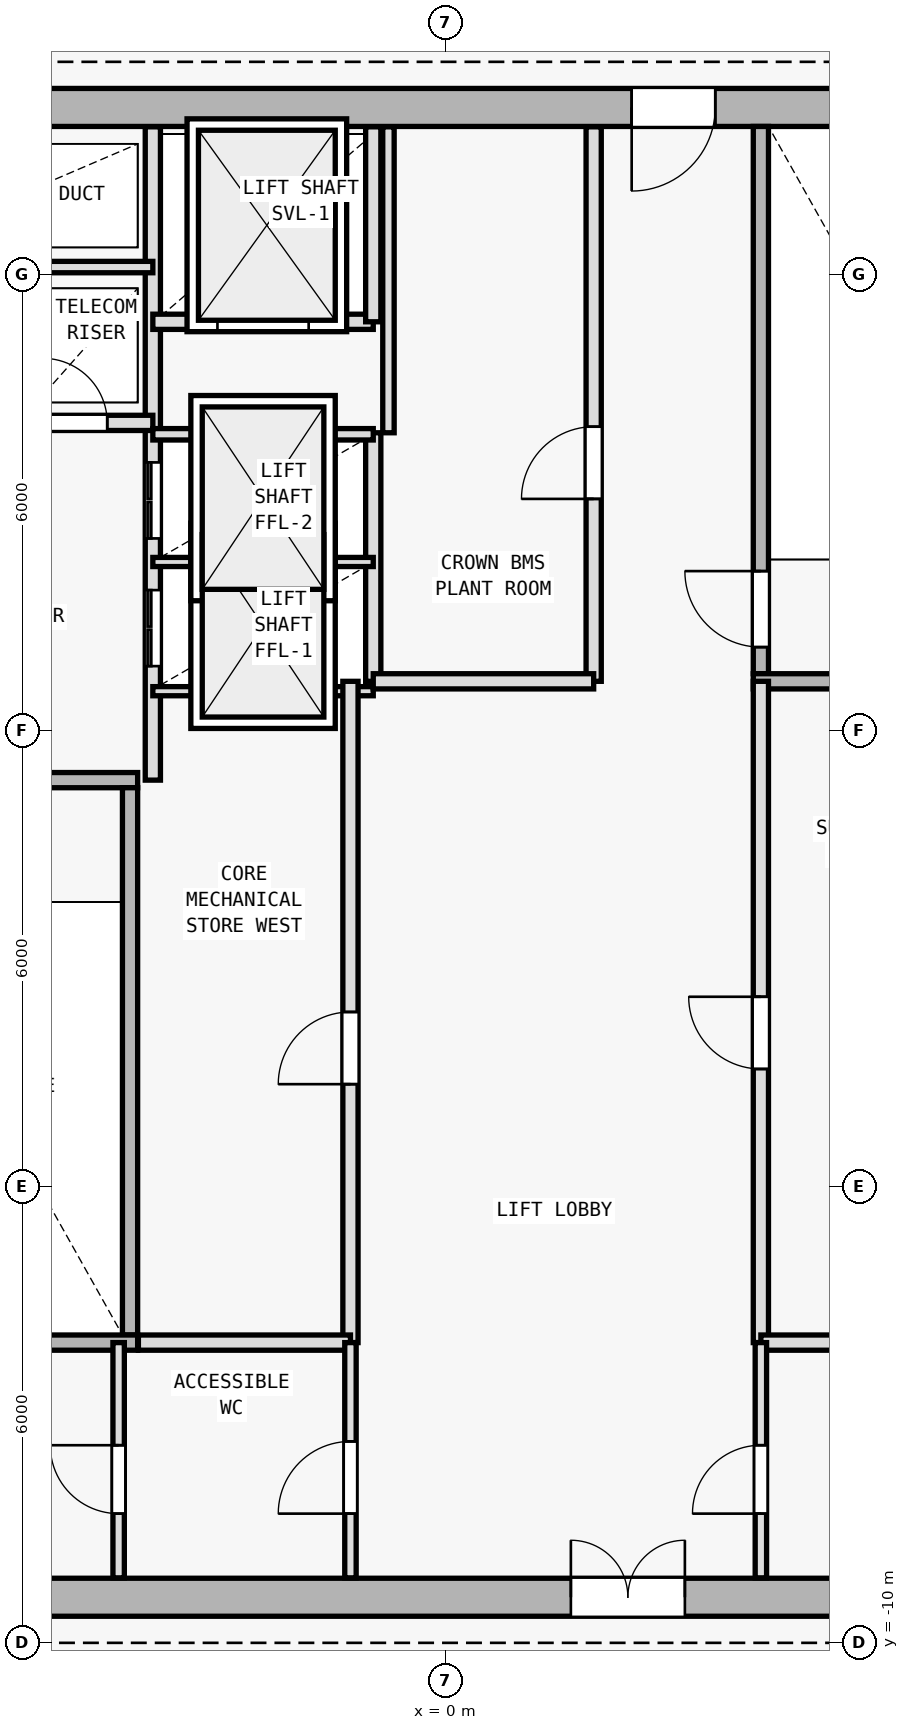
"""IFC4 building model, lengths in metres.
Left out: names, types, materials, properties, quantities, classifications, styles, units other than length and angle.
Written with IfcOpenShell. Run it as: python <this file> out.ifc"""

import sys

from ifc_helpers import new_model, si_unit, direction, frame, frame_2d, origin, origin_2d, place, context, subcontext, project, spatial, rectangle, i_section, extrude, element, fill, save


model = new_model("IFC4")
c1 = context("Model", 3, precision=1e-05, world=origin(), true_north=direction((0.0, 1.0)))
c2 = subcontext(c1, "Body", "Model", "MODEL_VIEW")
j1 = project(units=[si_unit("LENGTHUNIT", "METRE"), si_unit("PLANEANGLEUNIT", "RADIAN")], contexts=[c1])
p1 = place(None, origin())
s1 = spatial("IfcSite", under=j1, at=p1, CompositionType="ELEMENT")
p2 = place(p1, origin())
s2 = spatial("IfcBuilding", under=s1, at=p2, CompositionType="ELEMENT")
p3 = place(p2, frame((0.0, 0.0, 319.2)))
s3 = spatial("IfcBuildingStorey", under=s2, at=p3, CompositionType="ELEMENT", Elevation=319.2)
p4 = place(p3, frame((0.0, -9.4, 0.0), z_axis=(0.0, 0.0, 1.0), x_axis=(1.0, 0.0, 0.0)))
e1 = element("IfcColumn", 1, at=p4, inside=s3, PredefinedType="COLUMN", context=c2, shape_type="SweptSolid", body=[
    extrude(i_section(OverallWidth=0.374, OverallDepth=0.372, WebThickness=0.012, FlangeThickness=0.02, FilletRadius=0.015, at=origin_2d()), origin(), (0.0, 0.0, 1.0), 3.6),
])
p5 = place(p3, frame((-22.517, -9.441, 0.0), z_axis=(0.0, 0.0, 1.0), x_axis=(0.562470833944, 0.826817126675, 0.0)))
e2 = element("IfcWall", 2, at=p5, inside=s3, PredefinedType="SOLIDWALL", context=c2, shape_type="SweptSolid", body=[
    extrude(rectangle(XDim=36.623, YDim=0.22, at=frame_2d((18.312, 0.0))), origin(), (0.0, 0.0, 1.0), 2.447),
])
p6 = place(p3, frame((-7.95, -9.4, 0.0), z_axis=(0.0, 0.0, 1.0), x_axis=(1.0, 0.0, 0.0)))
e3 = element("IfcWall", 3, at=p6, inside=s3, PredefinedType="SHEAR", context=c2, shape_type="SweptSolid", body=[
    extrude(rectangle(XDim=15.9, YDim=0.5, at=frame_2d((7.95, 0.0))), origin(), (0.0, 0.0, 1.0), 2.4),
])
p7 = place(p6, frame((9.6, 0.0, 0.0)))
e4 = element("IfcOpeningElement", 4, at=p7, cuts=e3, PredefinedType="OPENING", context=c2, shape_type="SweptSolid", body=[
    extrude(rectangle(XDim=1.5, YDim=2.2, at=frame_2d((0.75, 1.1))), frame((0.0, 0.26, 0.0), z_axis=(0.0, -1.0, 0.0), x_axis=(1.0, 0.0, 0.0)), (0.0, 0.0, 1.0), 0.52),
])
p8 = place(p3, frame((7.95, 10.2, 0.0), z_axis=(0.0, 0.0, 1.0), x_axis=(-1.0, 0.0, 0.0)))
e5 = element("IfcWall", 5, at=p8, inside=s3, PredefinedType="SHEAR", context=c2, shape_type="SweptSolid", body=[
    extrude(rectangle(XDim=15.9, YDim=0.5, at=frame_2d((7.95, 0.0))), origin(), (0.0, 0.0, 1.0), 2.4),
])
p9 = place(p8, frame((4.4, 0.0, 0.0)))
e6 = element("IfcOpeningElement", 6, at=p9, cuts=e5, PredefinedType="OPENING", context=c2, shape_type="SweptSolid", body=[
    extrude(rectangle(XDim=1.1, YDim=2.15, at=frame_2d((0.55, 1.075))), frame((0.0, 0.26, 0.0), z_axis=(0.0, -1.0, 0.0), x_axis=(1.0, 0.0, 0.0)), (0.0, 0.0, 1.0), 0.52),
])
p10 = place(p3, frame((-7.45, 1.35, 0.0), z_axis=(0.0, 0.0, 1.0), x_axis=(1.0, 0.0, 0.0)))
e7 = element("IfcWall", 7, at=p10, inside=s3, PredefinedType="SOLIDWALL", context=c2, shape_type="SweptSolid", body=[
    extrude(rectangle(XDim=3.4, YDim=0.2, at=frame_2d((1.7, 0.0))), origin(), (0.0, 0.0, 1.0), 2.4),
])
p11 = place(p10, frame((0.65, 0.0, 0.0)))
e8 = element("IfcOpeningElement", 8, at=p11, cuts=e7, PredefinedType="OPENING", context=c2, shape_type="SweptSolid", body=[
    extrude(rectangle(XDim=1.0, YDim=2.15, at=frame_2d((0.5, 1.075))), frame((0.0, 0.11, 0.0), z_axis=(0.0, -1.0, 0.0), x_axis=(1.0, 0.0, 0.0)), (0.0, 0.0, 1.0), 0.22),
])
p12 = place(p3, frame((-4.15, -5.95, 0.0), z_axis=(0.0, 0.0, 1.0), x_axis=(0.0, 1.0, 0.0)))
e9 = element("IfcWall", 9, at=p12, inside=s3, PredefinedType="SOLIDWALL", context=c2, shape_type="SweptSolid", body=[
    extrude(rectangle(XDim=7.2, YDim=0.2, at=frame_2d((3.6, 0.0))), origin(), (0.0, 0.0, 1.0), 2.4),
])
p13 = place(p3, frame((-3.85, 1.35, 0.0), z_axis=(0.0, 0.0, 1.0), x_axis=(0.0, 1.0, 0.0)))
e10 = element("IfcWall", 10, at=p13, inside=s3, PredefinedType="SOLIDWALL", context=c2, shape_type="SweptSolid", body=[
    extrude(rectangle(XDim=8.595, YDim=0.2, at=frame_2d((4.297, 0.0))), origin(), (0.0, 0.0, 1.0), 2.4),
])
p14 = place(p13, frame((1.5, 0.0, 0.0)))
e11 = element("IfcOpeningElement", 11, at=p14, cuts=e10, PredefinedType="OPENING", context=c2, shape_type="SweptSolid", body=[
    extrude(rectangle(XDim=1.0, YDim=2.15, at=frame_2d((0.5, 1.075))), frame((0.0, 0.11, 0.0), z_axis=(0.0, -1.0, 0.0), x_axis=(1.0, 0.0, 0.0)), (0.0, 0.0, 1.0), 0.22),
])
p15 = place(p13, frame((3.18, 0.0, 0.0)))
e12 = element("IfcOpeningElement", 12, at=p15, cuts=e10, PredefinedType="OPENING", context=c2, shape_type="SweptSolid", body=[
    extrude(rectangle(XDim=1.0, YDim=2.15, at=frame_2d((0.5, 1.075))), frame((0.0, 0.11, 0.0), z_axis=(0.0, -1.0, 0.0), x_axis=(1.0, 0.0, 0.0)), (0.0, 0.0, 1.0), 0.22),
])
p16 = place(p3, frame((-7.445, 6.05, 0.0), z_axis=(0.0, 0.0, 1.0), x_axis=(1.0, 0.0, 0.0)))
e13 = element("IfcWall", 13, at=p16, inside=s3, PredefinedType="SOLIDWALL", context=c2, shape_type="SweptSolid", body=[
    extrude(rectangle(XDim=3.595, YDim=0.2, at=frame_2d((1.797, 0.0))), origin(), (0.0, 0.0, 1.0), 2.4),
])
p17 = place(p16, frame((0.345, 0.0, 0.0)))
e14 = element("IfcOpeningElement", 14, at=p17, cuts=e13, PredefinedType="OPENING", context=c2, shape_type="SweptSolid", body=[
    extrude(rectangle(XDim=0.85, YDim=2.1, at=frame_2d((0.425, 1.05))), frame((0.0, 0.11, 0.0), z_axis=(0.0, -1.0, 0.0), x_axis=(1.0, 0.0, 0.0)), (0.0, 0.0, 1.0), 0.22),
])
p18 = place(p16, frame((2.145, 0.0, 0.0)))
e15 = element("IfcOpeningElement", 15, at=p18, cuts=e13, PredefinedType="OPENING", context=c2, shape_type="SweptSolid", body=[
    extrude(rectangle(XDim=0.85, YDim=2.1, at=frame_2d((0.425, 1.05))), frame((0.0, 0.11, 0.0), z_axis=(0.0, -1.0, 0.0), x_axis=(1.0, 0.0, 0.0)), (0.0, 0.0, 1.0), 0.22),
])
p19 = place(p3, frame((-7.445, 8.1, 0.0), z_axis=(0.0, 0.0, 1.0), x_axis=(1.0, 0.0, 0.0)))
e16 = element("IfcWall", 16, at=p19, inside=s3, PredefinedType="PARTITIONING", context=c2, shape_type="SweptSolid", body=[
    extrude(rectangle(XDim=3.595, YDim=0.15, at=frame_2d((1.797, 0.0))), origin(), (0.0, 0.0, 1.0), 2.4),
])
p20 = place(p3, frame((4.15, 2.75, 0.0), z_axis=(0.0, 0.0, 1.0), x_axis=(0.0, 1.0, 0.0)))
e17 = element("IfcWall", 17, at=p20, inside=s3, PredefinedType="SOLIDWALL", context=c2, shape_type="SweptSolid", body=[
    extrude(rectangle(XDim=7.2, YDim=0.2, at=frame_2d((3.6, 0.0))), origin(), (0.0, 0.0, 1.0), 2.4),
])
p21 = place(p20, frame((0.35, 0.0, 0.0)))
e18 = element("IfcOpeningElement", 18, at=p21, cuts=e17, PredefinedType="OPENING", context=c2, shape_type="SweptSolid", body=[
    extrude(rectangle(XDim=1.0, YDim=2.15, at=frame_2d((0.5, 1.075))), frame((0.0, 0.11, 0.0), z_axis=(0.0, -1.0, 0.0), x_axis=(1.0, 0.0, 0.0)), (0.0, 0.0, 1.0), 0.22),
])
p22 = place(p3, frame((4.05, 2.65, 0.0), z_axis=(0.0, 0.0, 1.0), x_axis=(1.0, 0.0, 0.0)))
e19 = element("IfcWall", 19, at=p22, inside=s3, PredefinedType="SOLIDWALL", context=c2, shape_type="SweptSolid", body=[
    extrude(rectangle(XDim=3.4, YDim=0.2, at=frame_2d((1.7, 0.0))), origin(), (0.0, 0.0, 1.0), 2.4),
])
p23 = place(p3, frame((-0.95, 2.65, 0.0), z_axis=(0.0, 0.0, 1.0), x_axis=(0.0, 1.0, 0.0)))
e20 = element("IfcWall", 20, at=p23, inside=s3, PredefinedType="SOLIDWALL", context=c2, shape_type="SweptSolid", body=[
    extrude(rectangle(XDim=3.27, YDim=0.2, at=frame_2d((1.635, 0.0))), origin(), (0.0, 0.0, 1.0), 2.4),
])
for number, where, z_axis, x_axis in (
    (21, (-3.85, 2.52, 0.0), (0.0, 0.0, 1.0), (1.0, 0.0, 0.0)),
    (22, (-3.85, 4.22, 0.0), (0.0, 0.0, 1.0), (1.0, 0.0, 0.0)),
):
    element("IfcWall", number, at=place(p3, frame(where, z_axis=z_axis, x_axis=x_axis)), inside=s3, PredefinedType="PARTITIONING", context=c2, shape_type="SweptSolid", body=[
        extrude(rectangle(XDim=2.9, YDim=0.12, at=frame_2d((1.45, 0.0))), origin(), (0.0, 0.0, 1.0), 2.4),
    ])
p24 = place(p3, frame((-3.85, 5.9, 0.0), z_axis=(0.0, 0.0, 1.0), x_axis=(1.0, 0.0, 0.0)))
e23 = element("IfcWall", 23, at=p24, inside=s3, PredefinedType="PARTITIONING", context=c2, shape_type="SweptSolid", body=[
    extrude(rectangle(XDim=2.9, YDim=0.15, at=frame_2d((1.45, 0.0))), origin(), (0.0, 0.0, 1.0), 2.4),
])
p25 = place(p3, frame((-3.85, 7.38, 0.0), z_axis=(0.0, 0.0, 1.0), x_axis=(1.0, 0.0, 0.0)))
e24 = element("IfcWall", 24, at=p25, inside=s3, PredefinedType="SOLIDWALL", context=c2, shape_type="SweptSolid", body=[
    extrude(rectangle(XDim=2.9, YDim=0.2, at=frame_2d((1.45, 0.0))), origin(), (0.0, 0.0, 1.0), 2.4),
])
p26 = place(p25, frame((0.85, 0.0, 0.0)))
e25 = element("IfcOpeningElement", 25, at=p26, cuts=e24, PredefinedType="OPENING", context=c2, shape_type="SweptSolid", body=[
    extrude(rectangle(XDim=1.2, YDim=2.2, at=frame_2d((0.6, 1.1))), frame((0.0, 0.11, 0.0), z_axis=(0.0, -1.0, 0.0), x_axis=(1.0, 0.0, 0.0)), (0.0, 0.0, 1.0), 0.22),
])
p27 = place(p3, frame((-0.95, 7.38, 0.0), z_axis=(0.0, 0.0, 1.0), x_axis=(0.0, 1.0, 0.0)))
e26 = element("IfcWall", 26, at=p27, inside=s3, PredefinedType="SOLIDWALL", context=c2, shape_type="SweptSolid", body=[
    extrude(rectangle(XDim=2.565, YDim=0.2, at=frame_2d((1.283, 0.0))), origin(), (0.0, 0.0, 1.0), 2.4),
])
p28 = place(p3, frame((4.15, -6.05, 0.0), z_axis=(0.0, 0.0, 1.0), x_axis=(0.0, 1.0, 0.0)))
e27 = element("IfcWall", 27, at=p28, inside=s3, PredefinedType="SOLIDWALL", context=c2, shape_type="SweptSolid", body=[
    extrude(rectangle(XDim=8.7, YDim=0.2, at=frame_2d((4.35, 0.0))), origin(), (0.0, 0.0, 1.0), 2.4),
])
p29 = place(p28, frame((3.6, 0.0, 0.0)))
e28 = element("IfcOpeningElement", 28, at=p29, cuts=e27, PredefinedType="OPENING", context=c2, shape_type="SweptSolid", body=[
    extrude(rectangle(XDim=0.95, YDim=2.1, at=frame_2d((0.475, 1.05))), frame((0.0, 0.11, 0.0), z_axis=(0.0, -1.0, 0.0), x_axis=(1.0, 0.0, 0.0)), (0.0, 0.0, 1.0), 0.22),
])
p30 = place(p3, frame((-1.25, -6.05, 0.0), z_axis=(0.0, 0.0, 1.0), x_axis=(0.0, 1.0, 0.0)))
e29 = element("IfcWall", 29, at=p30, inside=s3, PredefinedType="SOLIDWALL", context=c2, shape_type="SweptSolid", body=[
    extrude(rectangle(XDim=8.7, YDim=0.2, at=frame_2d((4.35, 0.0))), origin(), (0.0, 0.0, 1.0), 2.4),
])
p31 = place(p30, frame((3.4, 0.0, 0.0)))
e30 = element("IfcOpeningElement", 30, at=p31, cuts=e29, PredefinedType="OPENING", context=c2, shape_type="SweptSolid", body=[
    extrude(rectangle(XDim=0.95, YDim=2.1, at=frame_2d((0.475, 1.05))), frame((0.0, 0.11, 0.0), z_axis=(0.0, -1.0, 0.0), x_axis=(1.0, 0.0, 0.0)), (0.0, 0.0, 1.0), 0.22),
])
p32 = place(p3, frame((1.95, 2.65, 0.0), z_axis=(0.0, 0.0, 1.0), x_axis=(0.0, 1.0, 0.0)))
e31 = element("IfcWall", 31, at=p32, inside=s3, PredefinedType="SOLIDWALL", context=c2, shape_type="SweptSolid", body=[
    extrude(rectangle(XDim=7.295, YDim=0.2, at=frame_2d((3.647, 0.0))), origin(), (0.0, 0.0, 1.0), 2.4),
])
p33 = place(p32, frame((2.4, 0.0, 0.0)))
e32 = element("IfcOpeningElement", 32, at=p33, cuts=e31, PredefinedType="OPENING", context=c2, shape_type="SweptSolid", body=[
    extrude(rectangle(XDim=0.95, YDim=2.1, at=frame_2d((0.475, 1.05))), frame((0.0, 0.11, 0.0), z_axis=(0.0, -1.0, 0.0), x_axis=(1.0, 0.0, 0.0)), (0.0, 0.0, 1.0), 0.22),
])
p34 = place(p3, frame((-0.95, 2.65, 0.0), z_axis=(0.0, 0.0, 1.0), x_axis=(1.0, 0.0, 0.0)))
e33 = element("IfcWall", 33, at=p34, inside=s3, PredefinedType="SOLIDWALL", context=c2, shape_type="SweptSolid", body=[
    extrude(rectangle(XDim=2.9, YDim=0.2, at=frame_2d((1.45, 0.0))), origin(), (0.0, 0.0, 1.0), 2.4),
])
p35 = place(p3, frame((-0.75, 5.92, 0.0), z_axis=(0.0, 0.0, 1.0), x_axis=(0.0, 1.0, 0.0)))
e34 = element("IfcWall", 34, at=p35, inside=s3, PredefinedType="PARTITIONING", context=c2, shape_type="SweptSolid", body=[
    extrude(rectangle(XDim=4.025, YDim=0.15, at=frame_2d((2.013, 0.0))), origin(), (0.0, 0.0, 1.0), 2.4),
])
p36 = place(p3, frame((-7.45, -6.05, 0.0), z_axis=(0.0, 0.0, 1.0), x_axis=(1.0, 0.0, 0.0)))
e35 = element("IfcWall", 35, at=p36, inside=s3, PredefinedType="SOLIDWALL", context=c2, shape_type="SweptSolid", body=[
    extrude(rectangle(XDim=3.4, YDim=0.2, at=frame_2d((1.7, 0.0))), origin(), (0.0, 0.0, 1.0), 2.4),
])
p37 = place(p3, frame((-4.04, -6.05, 0.0), z_axis=(0.0, 0.0, 1.0), x_axis=(1.0, 0.0, 0.0)))
e36 = element("IfcWall", 36, at=p37, inside=s3, PredefinedType="SOLIDWALL", context=c2, shape_type="SweptSolid", body=[
    extrude(rectangle(XDim=2.79, YDim=0.2, at=frame_2d((1.395, 0.0))), origin(), (0.0, 0.0, 1.0), 2.4),
])
p38 = place(p3, frame((4.15, -6.05, 0.0), z_axis=(0.0, 0.0, 1.0), x_axis=(1.0, 0.0, 0.0)))
e37 = element("IfcWall", 37, at=p38, inside=s3, PredefinedType="SOLIDWALL", context=c2, shape_type="SweptSolid", body=[
    extrude(rectangle(XDim=3.295, YDim=0.2, at=frame_2d((1.647, 0.0))), origin(), (0.0, 0.0, 1.0), 2.4),
])
p39 = place(p3, frame((-1.25, -9.145, 0.0), z_axis=(0.0, 0.0, 1.0), x_axis=(0.0, 1.0, 0.0)))
e38 = element("IfcWall", 38, at=p39, inside=s3, PredefinedType="PARTITIONING", context=c2, shape_type="SweptSolid", body=[
    extrude(rectangle(XDim=3.095, YDim=0.15, at=frame_2d((1.547, 0.0))), origin(), (0.0, 0.0, 1.0), 2.4),
])
p40 = place(p39, frame((0.845, 0.0, 0.0)))
e39 = element("IfcOpeningElement", 39, at=p40, cuts=e38, PredefinedType="OPENING", context=c2, shape_type="SweptSolid", body=[
    extrude(rectangle(XDim=0.95, YDim=2.1, at=frame_2d((0.475, 1.05))), frame((0.0, 0.085, 0.0), z_axis=(0.0, -1.0, 0.0), x_axis=(1.0, 0.0, 0.0)), (0.0, 0.0, 1.0), 0.17),
])
p41 = place(p3, frame((4.15, -9.145, 0.0), z_axis=(0.0, 0.0, 1.0), x_axis=(0.0, 1.0, 0.0)))
e40 = element("IfcWall", 40, at=p41, inside=s3, PredefinedType="PARTITIONING", context=c2, shape_type="SweptSolid", body=[
    extrude(rectangle(XDim=3.095, YDim=0.15, at=frame_2d((1.547, 0.0))), origin(), (0.0, 0.0, 1.0), 2.4),
])
p42 = place(p41, frame((0.845, 0.0, 0.0)))
e41 = element("IfcOpeningElement", 41, at=p42, cuts=e40, PredefinedType="OPENING", context=c2, shape_type="SweptSolid", body=[
    extrude(rectangle(XDim=0.9, YDim=2.1, at=frame_2d((0.45, 1.05))), frame((0.0, 0.085, 0.0), z_axis=(0.0, -1.0, 0.0), x_axis=(1.0, 0.0, 0.0)), (0.0, 0.0, 1.0), 0.17),
])
p43 = place(p3, frame((-4.3, -9.145, 0.0), z_axis=(0.0, 0.0, 1.0), x_axis=(0.0, 1.0, 0.0)))
e42 = element("IfcWall", 42, at=p43, inside=s3, PredefinedType="PARTITIONING", context=c2, shape_type="SweptSolid", body=[
    extrude(rectangle(XDim=3.095, YDim=0.15, at=frame_2d((1.547, 0.0))), origin(), (0.0, 0.0, 1.0), 2.4),
])
p44 = place(p43, frame((0.845, 0.0, 0.0)))
e43 = element("IfcOpeningElement", 43, at=p44, cuts=e42, PredefinedType="OPENING", context=c2, shape_type="SweptSolid", body=[
    extrude(rectangle(XDim=0.9, YDim=2.1, at=frame_2d((0.45, 1.05))), frame((0.0, 0.085, 0.0), z_axis=(0.0, -1.0, 0.0), x_axis=(1.0, 0.0, 0.0)), (0.0, 0.0, 1.0), 0.17),
])
p45 = place(p7, origin())
e44 = element("IfcDoor", 44, at=p45, inside=s3, OperationType="DOUBLE_DOOR_SINGLE_SWING", PredefinedType="DOOR", context=c2, shape_type="SweptSolid", body=[
    extrude(rectangle(XDim=1.5, YDim=2.2, at=frame_2d((0.75, 1.1))), frame((0.0, 0.025, 0.0), z_axis=(0.0, -1.0, 0.0), x_axis=(1.0, 0.0, 0.0)), (0.0, 0.0, 1.0), 0.05),
])
fill(e4, e44)
p46 = place(p9, origin())
e45 = element("IfcDoor", 45, at=p46, inside=s3, OperationType="SINGLE_SWING_RIGHT", PredefinedType="DOOR", context=c2, shape_type="SweptSolid", body=[
    extrude(rectangle(XDim=1.1, YDim=2.15, at=frame_2d((0.55, 1.075))), frame((0.0, 0.025, 0.0), z_axis=(0.0, -1.0, 0.0), x_axis=(1.0, 0.0, 0.0)), (0.0, 0.0, 1.0), 0.05),
])
fill(e6, e45)
p47 = place(p18, origin())
e46 = element("IfcDoor", 46, at=p47, inside=s3, OperationType="SINGLE_SWING_LEFT", PredefinedType="DOOR", context=c2, shape_type="SweptSolid", body=[
    extrude(rectangle(XDim=0.85, YDim=2.1, at=frame_2d((0.425, 1.05))), frame((0.0, 0.025, 0.0), z_axis=(0.0, -1.0, 0.0), x_axis=(1.0, 0.0, 0.0)), (0.0, 0.0, 1.0), 0.05),
])
fill(e15, e46)
p48 = place(p21, origin())
e47 = element("IfcDoor", 47, at=p48, inside=s3, OperationType="SINGLE_SWING_RIGHT", PredefinedType="DOOR", context=c2, shape_type="SweptSolid", body=[
    extrude(rectangle(XDim=1.0, YDim=2.15, at=frame_2d((0.5, 1.075))), frame((0.0, 0.025, 0.0), z_axis=(0.0, -1.0, 0.0), x_axis=(1.0, 0.0, 0.0)), (0.0, 0.0, 1.0), 0.05),
])
fill(e18, e47)
p49 = place(p26, origin())
e48 = element("IfcDoor", 48, at=p49, inside=s3, OperationType="DOUBLE_DOOR_SLIDING", PredefinedType="DOOR", context=c2, shape_type="SweptSolid", body=[
    extrude(rectangle(XDim=1.2, YDim=2.2, at=frame_2d((0.6, 1.1))), frame((0.0, 0.025, 0.0), z_axis=(0.0, -1.0, 0.0), x_axis=(1.0, 0.0, 0.0)), (0.0, 0.0, 1.0), 0.05),
])
fill(e25, e48)
p50 = place(p29, origin())
e49 = element("IfcDoor", 49, at=p50, inside=s3, OperationType="SINGLE_SWING_RIGHT", PredefinedType="DOOR", context=c2, shape_type="SweptSolid", body=[
    extrude(rectangle(XDim=0.95, YDim=2.1, at=frame_2d((0.475, 1.05))), frame((0.0, 0.025, 0.0), z_axis=(0.0, -1.0, 0.0), x_axis=(1.0, 0.0, 0.0)), (0.0, 0.0, 1.0), 0.05),
])
fill(e28, e49)
p51 = place(p31, origin())
e50 = element("IfcDoor", 50, at=p51, inside=s3, OperationType="SINGLE_SWING_LEFT", PredefinedType="DOOR", context=c2, shape_type="SweptSolid", body=[
    extrude(rectangle(XDim=0.95, YDim=2.1, at=frame_2d((0.475, 1.05))), frame((0.0, 0.025, 0.0), z_axis=(0.0, -1.0, 0.0), x_axis=(1.0, 0.0, 0.0)), (0.0, 0.0, 1.0), 0.05),
])
fill(e30, e50)
p52 = place(p33, origin())
e51 = element("IfcDoor", 51, at=p52, inside=s3, OperationType="SINGLE_SWING_LEFT", PredefinedType="DOOR", context=c2, shape_type="SweptSolid", body=[
    extrude(rectangle(XDim=0.95, YDim=2.1, at=frame_2d((0.475, 1.05))), frame((0.0, 0.025, 0.0), z_axis=(0.0, -1.0, 0.0), x_axis=(1.0, 0.0, 0.0)), (0.0, 0.0, 1.0), 0.05),
])
fill(e32, e51)
p53 = place(p14, origin())
e52 = element("IfcDoor", 52, at=p53, inside=s3, OperationType="DOUBLE_DOOR_SLIDING", PredefinedType="DOOR", context=c2, shape_type="SweptSolid", body=[
    extrude(rectangle(XDim=1.0, YDim=2.15, at=frame_2d((0.5, 1.075))), frame((0.0, 0.025, 0.0), z_axis=(0.0, -1.0, 0.0), x_axis=(1.0, 0.0, 0.0)), (0.0, 0.0, 1.0), 0.05),
])
fill(e11, e52)
p54 = place(p15, origin())
e53 = element("IfcDoor", 53, at=p54, inside=s3, OperationType="DOUBLE_DOOR_SLIDING", PredefinedType="DOOR", context=c2, shape_type="SweptSolid", body=[
    extrude(rectangle(XDim=1.0, YDim=2.15, at=frame_2d((0.5, 1.075))), frame((0.0, 0.025, 0.0), z_axis=(0.0, -1.0, 0.0), x_axis=(1.0, 0.0, 0.0)), (0.0, 0.0, 1.0), 0.05),
])
fill(e12, e53)
p55 = place(p40, origin())
e54 = element("IfcDoor", 54, at=p55, inside=s3, OperationType="SINGLE_SWING_LEFT", PredefinedType="DOOR", context=c2, shape_type="SweptSolid", body=[
    extrude(rectangle(XDim=0.95, YDim=2.1, at=frame_2d((0.475, 1.05))), frame((0.0, 0.025, 0.0), z_axis=(0.0, -1.0, 0.0), x_axis=(1.0, 0.0, 0.0)), (0.0, 0.0, 1.0), 0.05),
])
fill(e39, e54)
p56 = place(p44, origin())
e55 = element("IfcDoor", 55, at=p56, inside=s3, OperationType="SINGLE_SWING_RIGHT", PredefinedType="DOOR", context=c2, shape_type="SweptSolid", body=[
    extrude(rectangle(XDim=0.9, YDim=2.1, at=frame_2d((0.45, 1.05))), frame((0.0, 0.025, 0.0), z_axis=(0.0, -1.0, 0.0), x_axis=(1.0, 0.0, 0.0)), (0.0, 0.0, 1.0), 0.05),
])
fill(e43, e55)
p57 = place(p42, origin())
e56 = element("IfcDoor", 56, at=p57, inside=s3, OperationType="SINGLE_SWING_LEFT", PredefinedType="DOOR", context=c2, shape_type="SweptSolid", body=[
    extrude(rectangle(XDim=0.9, YDim=2.1, at=frame_2d((0.45, 1.05))), frame((0.0, 0.025, 0.0), z_axis=(0.0, -1.0, 0.0), x_axis=(1.0, 0.0, 0.0)), (0.0, 0.0, 1.0), 0.05),
])
fill(e41, e56)
save(model, sys.argv[1])
